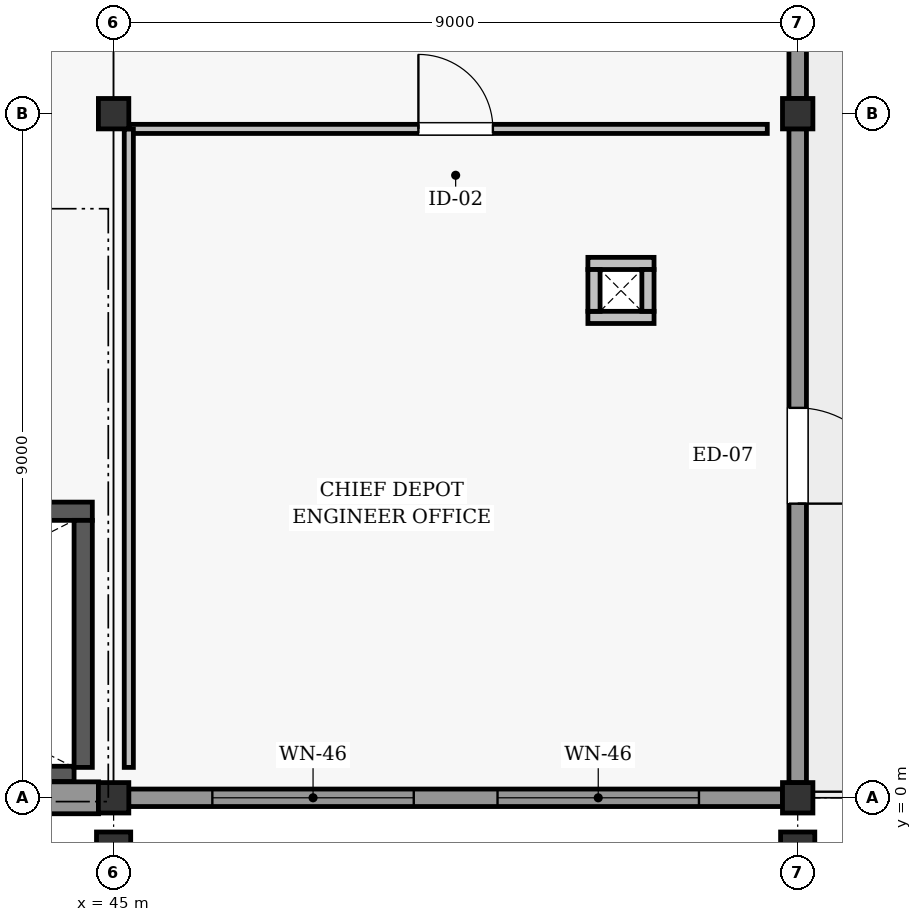
"""IFC4 building model, lengths in metres.
Left out: names, types, materials, properties, quantities, classifications, styles, units other than length and angle.
Written with IfcOpenShell. Run it as: python <this file> out.ifc"""

import sys

from ifc_helpers import new_model, si_unit, direction, frame, frame_2d, origin, origin_2d, place, context, subcontext, project, spatial, rectangle, extrude, element, fill, save


model = new_model("IFC4")
c1 = context("Model", 3, precision=1e-05, world=origin(), true_north=direction((0.0, 1.0)))
c2 = subcontext(c1, "Body", "Model", "MODEL_VIEW")
j1 = project(units=[si_unit("LENGTHUNIT", "METRE"), si_unit("PLANEANGLEUNIT", "RADIAN")], contexts=[c1])
p1 = place(None, origin())
s1 = spatial("IfcSite", under=j1, at=p1, CompositionType="ELEMENT")
p2 = place(p1, origin())
s2 = spatial("IfcBuilding", under=s1, at=p2, CompositionType="ELEMENT")
p3 = place(p2, frame((0.0, 0.0, 15.0)))
s3 = spatial("IfcBuildingStorey", under=s2, at=p3, CompositionType="ELEMENT", Elevation=15.0)
for number, where, z_axis, x_axis in (
    (1, (45.0, 0.0, 0.0), (0.0, 0.0, 1.0), (1.0, 0.0, 0.0)),
    (2, (45.0, 9.0, 0.0), (0.0, 0.0, 1.0), (1.0, 0.0, 0.0)),
    (3, (54.0, 0.0, 0.0), (0.0, 0.0, 1.0), (1.0, 0.0, 0.0)),
    (4, (54.0, 9.0, 0.0), (0.0, 0.0, 1.0), (1.0, 0.0, 0.0)),
):
    element("IfcColumn", number, at=place(p3, frame(where, z_axis=z_axis, x_axis=x_axis)), inside=s3, PredefinedType="COLUMN", context=c2, shape_type="SweptSolid", body=[
        extrude(rectangle(XDim=0.4, YDim=0.4, at=origin_2d()), origin(), (0.0, 0.0, 1.0), 3.0),
    ])
for number, where, z_axis, x_axis in (
    (5, (45.0, -0.75, 0.0), (0.0, 0.0, 1.0), (1.0, 0.0, 0.0)),
    (6, (54.0, -0.75, 0.0), (0.0, 0.0, 1.0), (1.0, 0.0, 0.0)),
):
    element("IfcColumn", number, at=place(p3, frame(where, z_axis=z_axis, x_axis=x_axis)), inside=s3, PredefinedType="PILASTER", context=c2, shape_type="SweptSolid", body=[
        extrude(rectangle(XDim=0.45, YDim=0.6, at=origin_2d()), origin(), (0.0, 0.0, 1.0), 3.95),
    ])
p4 = place(p3, frame((36.198, 0.0, 0.0), z_axis=(0.0, 0.0, 1.0), x_axis=(1.0, 0.0, 0.0)))
e7 = element("IfcWall", 7, at=p4, inside=s3, PredefinedType="SOLIDWALL", context=c2, shape_type="SweptSolid", body=[
    extrude(rectangle(XDim=8.604, YDim=0.42, at=frame_2d((4.302, 0.0))), origin(), (0.0, 0.0, 1.0), 2.242),
])
p5 = place(p3, frame((45.198, 0.0, 0.0), z_axis=(0.0, 0.0, 1.0), x_axis=(1.0, 0.0, 0.0)))
e8 = element("IfcWall", 8, at=p5, inside=s3, PredefinedType="SOLIDWALL", context=c2, shape_type="SweptSolid", body=[
    extrude(rectangle(XDim=8.604, YDim=0.23, at=frame_2d((4.302, 0.0))), origin(), (0.0, 0.0, 1.0), 2.242),
])
p6 = place(p5, frame((1.101, 0.0, 1.14)))
e9 = element("IfcOpeningElement", 9, at=p6, cuts=e8, PredefinedType="OPENING", context=c2, shape_type="SweptSolid", body=[
    extrude(rectangle(XDim=2.65, YDim=0.92, at=frame_2d((1.325, 0.46))), frame((0.0, 0.125, 0.0), z_axis=(0.0, -1.0, 0.0), x_axis=(1.0, 0.0, 0.0)), (0.0, 0.0, 1.0), 0.25),
])
p7 = place(p5, frame((4.853, 0.0, 1.14)))
e10 = element("IfcOpeningElement", 10, at=p7, cuts=e8, PredefinedType="OPENING", context=c2, shape_type="SweptSolid", body=[
    extrude(rectangle(XDim=2.65, YDim=0.92, at=frame_2d((1.325, 0.46))), frame((0.0, 0.125, 0.0), z_axis=(0.0, -1.0, 0.0), x_axis=(1.0, 0.0, 0.0)), (0.0, 0.0, 1.0), 0.25),
])
p8 = place(p3, frame((54.0, 0.198, 0.0), z_axis=(0.0, 0.0, 1.0), x_axis=(0.0, 1.0, 0.0)))
e11 = element("IfcWall", 11, at=p8, inside=s3, PredefinedType="SOLIDWALL", context=c2, shape_type="SweptSolid", body=[
    extrude(rectangle(XDim=8.604, YDim=0.23, at=frame_2d((4.302, 0.0))), origin(), (0.0, 0.0, 1.0), 2.242),
])
p9 = place(p8, frame((3.672, 0.0, 0.0)))
e12 = element("IfcOpeningElement", 12, at=p9, cuts=e11, PredefinedType="OPENING", context=c2, shape_type="SweptSolid", body=[
    extrude(rectangle(XDim=1.26, YDim=2.02, at=frame_2d((0.63, 1.01))), frame((0.0, 0.125, 0.0), z_axis=(0.0, -1.0, 0.0), x_axis=(1.0, 0.0, 0.0)), (0.0, 0.0, 1.0), 0.25),
])
p10 = place(p3, frame((54.0, 9.198, 0.0), z_axis=(0.0, 0.0, 1.0), x_axis=(0.0, 1.0, 0.0)))
e13 = element("IfcWall", 13, at=p10, inside=s3, PredefinedType="SOLIDWALL", context=c2, shape_type="SweptSolid", body=[
    extrude(rectangle(XDim=8.604, YDim=0.23, at=frame_2d((4.302, 0.0))), origin(), (0.0, 0.0, 1.0), 2.242),
])
p11 = place(p10, frame((2.095, 0.0, 0.66)))
e14 = element("IfcOpeningElement", 14, at=p11, cuts=e13, PredefinedType="OPENING", context=c2, shape_type="SweptSolid", body=[
    extrude(rectangle(XDim=1.16, YDim=1.4, at=frame_2d((0.58, 0.7))), frame((0.0, 0.125, 0.0), z_axis=(0.0, -1.0, 0.0), x_axis=(1.0, 0.0, 0.0)), (0.0, 0.0, 1.0), 0.25),
])
p12 = place(p10, frame((5.349, 0.0, 0.66)))
e15 = element("IfcOpeningElement", 15, at=p12, cuts=e13, PredefinedType="OPENING", context=c2, shape_type="SweptSolid", body=[
    extrude(rectangle(XDim=1.16, YDim=1.4, at=frame_2d((0.58, 0.7))), frame((0.0, 0.125, 0.0), z_axis=(0.0, -1.0, 0.0), x_axis=(1.0, 0.0, 0.0)), (0.0, 0.0, 1.0), 0.25),
])
p13 = place(p3, frame((38.07, 0.315, 0.0), z_axis=(0.0, 0.0, 1.0), x_axis=(1.0, 0.0, 0.0)))
e16 = element("IfcWall", 16, at=p13, inside=s3, PredefinedType="SHEAR", context=c2, shape_type="SweptSolid", body=[
    extrude(rectangle(XDim=6.41, YDim=0.2, at=frame_2d((3.205, 0.0))), origin(), (0.0, 0.0, 1.0), 2.79),
])
p14 = place(p3, frame((36.28, 3.77, 0.0), z_axis=(0.0, 0.0, 1.0), x_axis=(1.0, 0.0, 0.0)))
e17 = element("IfcWall", 17, at=p14, inside=s3, PredefinedType="SHEAR", context=c2, shape_type="SweptSolid", body=[
    extrude(rectangle(XDim=8.44, YDim=0.24, at=frame_2d((4.22, 0.0))), origin(), (0.0, 0.0, 1.0), 2.79),
])
p15 = place(p14, frame((0.48, 0.0, 0.0)))
e18 = element("IfcOpeningElement", 18, at=p15, cuts=e17, PredefinedType="OPENING", context=c2, shape_type="SweptSolid", body=[
    extrude(rectangle(XDim=1.08, YDim=2.08, at=frame_2d((0.54, 1.04))), frame((0.0, 0.13, 0.0), z_axis=(0.0, -1.0, 0.0), x_axis=(1.0, 0.0, 0.0)), (0.0, 0.0, 1.0), 0.26),
])
p16 = place(p3, frame((44.6, 0.4, 0.0), z_axis=(0.0, 0.0, 1.0), x_axis=(0.0, 1.0, 0.0)))
e19 = element("IfcWall", 19, at=p16, inside=s3, PredefinedType="SHEAR", context=c2, shape_type="SweptSolid", body=[
    extrude(rectangle(XDim=3.25, YDim=0.24, at=frame_2d((1.625, 0.0))), origin(), (0.0, 0.0, 1.0), 2.79),
])
for number, where, z_axis, x_axis in (
    (20, (51.24, 6.32, 0.0), (0.0, 0.0, 1.0), (1.0, 0.0, 0.0)),
    (21, (51.24, 7.03, 0.0), (0.0, 0.0, 1.0), (1.0, 0.0, 0.0)),
):
    element("IfcWall", number, at=place(p3, frame(where, z_axis=z_axis, x_axis=x_axis)), inside=s3, PredefinedType="PARTITIONING", context=c2, shape_type="SweptSolid", body=[
        extrude(rectangle(XDim=0.87, YDim=0.16, at=frame_2d((0.435, 0.0))), origin(), (0.0, 0.0, 1.0), 2.79),
    ])
for number, where, z_axis, x_axis in (
    (22, (51.32, 6.4, 0.0), (0.0, 0.0, 1.0), (0.0, 1.0, 0.0)),
    (23, (52.03, 6.4, 0.0), (0.0, 0.0, 1.0), (0.0, 1.0, 0.0)),
):
    element("IfcWall", number, at=place(p3, frame(where, z_axis=z_axis, x_axis=x_axis)), inside=s3, PredefinedType="PARTITIONING", context=c2, shape_type="SweptSolid", body=[
        extrude(rectangle(XDim=0.55, YDim=0.16, at=frame_2d((0.275, 0.0))), origin(), (0.0, 0.0, 1.0), 2.79),
    ])
p17 = place(p3, frame((45.2, 8.8, 0.0), z_axis=(0.0, 0.0, 1.0), x_axis=(1.0, 0.0, 0.0)))
e24 = element("IfcWall", 24, at=p17, inside=s3, PredefinedType="PARTITIONING", context=c2, shape_type="SweptSolid", body=[
    extrude(rectangle(XDim=8.4, YDim=0.12, at=frame_2d((4.2, 0.0))), origin(), (0.0, 0.0, 1.0), 2.245),
])
p18 = place(p17, frame((3.81, 0.0, 0.0)))
e25 = element("IfcOpeningElement", 25, at=p18, cuts=e24, PredefinedType="OPENING", context=c2, shape_type="SweptSolid", body=[
    extrude(rectangle(XDim=0.98, YDim=2.08, at=frame_2d((0.49, 1.04))), frame((0.0, 0.07, 0.0), z_axis=(0.0, -1.0, 0.0), x_axis=(1.0, 0.0, 0.0)), (0.0, 0.0, 1.0), 0.14),
])
p19 = place(p3, frame((45.2, 0.4, 0.0), z_axis=(0.0, 0.0, 1.0), x_axis=(0.0, 1.0, 0.0)))
e26 = element("IfcWall", 26, at=p19, inside=s3, PredefinedType="PARTITIONING", context=c2, shape_type="SweptSolid", body=[
    extrude(rectangle(XDim=8.4, YDim=0.12, at=frame_2d((4.2, 0.0))), origin(), (0.0, 0.0, 1.0), 2.245),
])
p20 = place(p6, origin())
e27 = element("IfcWindow", 27, at=p20, inside=s3, PartitioningType="SINGLE_PANEL", PredefinedType="WINDOW", context=c2, shape_type="SweptSolid", body=[
    extrude(rectangle(XDim=2.65, YDim=0.92, at=frame_2d((1.325, 0.46))), frame((0.0, 0.03, 0.0), z_axis=(0.0, -1.0, 0.0), x_axis=(1.0, 0.0, 0.0)), (0.0, 0.0, 1.0), 0.06),
])
fill(e9, e27)
p21 = place(p7, origin())
e28 = element("IfcWindow", 28, at=p21, inside=s3, PartitioningType="SINGLE_PANEL", PredefinedType="WINDOW", context=c2, shape_type="SweptSolid", body=[
    extrude(rectangle(XDim=2.65, YDim=0.92, at=frame_2d((1.325, 0.46))), frame((0.0, 0.03, 0.0), z_axis=(0.0, -1.0, 0.0), x_axis=(1.0, 0.0, 0.0)), (0.0, 0.0, 1.0), 0.06),
])
fill(e10, e28)
p22 = place(p9, frame((1.26, 0.0, 0.0), z_axis=(0.0, 0.0, 1.0), x_axis=(-1.0, 0.0, 0.0)))
e29 = element("IfcDoor", 29, at=p22, inside=s3, OperationType="SINGLE_SWING_LEFT", PredefinedType="DOOR", context=c2, shape_type="SweptSolid", body=[
    extrude(rectangle(XDim=1.26, YDim=2.02, at=frame_2d((0.63, 1.01))), frame((0.0, 0.025, 0.0), z_axis=(0.0, -1.0, 0.0), x_axis=(1.0, 0.0, 0.0)), (0.0, 0.0, 1.0), 0.05),
])
fill(e12, e29)
p23 = place(p18, origin())
e30 = element("IfcDoor", 30, at=p23, inside=s3, OperationType="SINGLE_SWING_LEFT", PredefinedType="DOOR", context=c2, shape_type="SweptSolid", body=[
    extrude(rectangle(XDim=0.98, YDim=2.08, at=frame_2d((0.49, 1.04))), frame((0.0, 0.025, 0.0), z_axis=(0.0, -1.0, 0.0), x_axis=(1.0, 0.0, 0.0)), (0.0, 0.0, 1.0), 0.05),
])
fill(e25, e30)
save(model, sys.argv[1])
